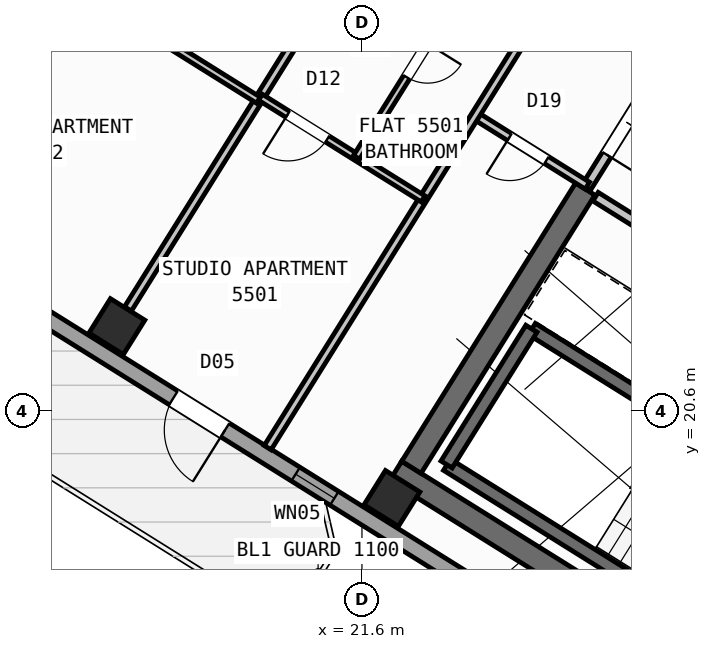
"""IFC4 building model, lengths in metres.
Left out: names, types, materials, properties, quantities, classifications, styles, units other than length and angle.
Written with IfcOpenShell. Run it as: python <this file> out.ifc"""

import sys

from ifc_helpers import new_model, si_unit, direction, frame, frame_2d, origin, origin_2d, place, context, subcontext, project, spatial, rectangle, hollow_rectangle, extrude, source, transform, mapped, element, fill, save


model = new_model("IFC4")
c1 = context("Model", 3, precision=1e-05, world=origin(), true_north=direction((0.0, 1.0)))
c2 = subcontext(c1, "Body", "Model", "MODEL_VIEW")
j1 = project(units=[si_unit("LENGTHUNIT", "METRE"), si_unit("PLANEANGLEUNIT", "RADIAN")], contexts=[c1])
p1 = place(None, origin())
s1 = spatial("IfcSite", under=j1, at=p1, CompositionType="ELEMENT")
p2 = place(p1, origin())
s2 = spatial("IfcBuilding", under=s1, at=p2, CompositionType="ELEMENT")
p3 = place(p2, frame((0.0, 0.0, 218.4)))
s3 = spatial("IfcBuildingStorey", under=s2, at=p3, CompositionType="ELEMENT", Elevation=218.4)
p4 = place(p3, frame((33.324, 12.503, 0.0), z_axis=(0.0, 0.0, 1.0), x_axis=(-0.848043529849, 0.529926571782, 0.0)))
e1 = element("IfcWall", 1, at=p4, inside=s3, PredefinedType="SHEAR", context=c2, shape_type="SweptSolid", body=[
    extrude(rectangle(XDim=13.04, YDim=0.45, at=frame_2d((6.52, 0.0))), origin(), (0.0, 0.0, 1.0), 3.35),
])
p5 = place(p3, frame((26.007, 24.976, 0.0), z_axis=(0.0, 0.0, 1.0), x_axis=(-0.529931155655, -0.848040665456, 0.0)))
e2 = element("IfcWall", 2, at=p5, inside=s3, PredefinedType="SHEAR", context=c2, shape_type="SweptSolid", body=[
    extrude(rectangle(XDim=6.475, YDim=0.45, at=frame_2d((3.238, 0.0))), origin(), (0.0, 0.0, 1.0), 3.35),
])
m1 = source(origin(), c2, "Body", "SweptSolid", [
    extrude(hollow_rectangle(XDim=0.8, YDim=0.8, WallThickness=0.032, at=origin_2d()), origin(), (0.0, 0.0, 1.0), 3.6),
])
for number, where, z_axis, x_axis in (
    (3, (22.191, 18.87, 0.0), (0.0, 0.0, 1.0), (-0.848, 0.53, 0.0)),
    (4, (16.764, 22.261, 0.0), (0.0, 0.0, 1.0), (-0.848, 0.53, 0.0)),
):
    element("IfcColumn", number, at=place(p3, frame(where, z_axis=z_axis, x_axis=x_axis)), inside=s3, PredefinedType="COLUMN", context=c2, shape_type="MappedRepresentation", body=[
        mapped(m1, transform((0.0, 0.0, 0.0), scale=1.0)),
    ])
p6 = place(p3, frame((31.76, 12.183, 0.0), z_axis=(0.0, 0.0, 1.0), x_axis=(-0.848047074256, 0.529920899612, 0.0)))
e5 = element("IfcWall", 5, at=p6, inside=s3, PredefinedType="STANDARD", context=c2, shape_type="SweptSolid", body=[
    extrude(rectangle(XDim=30.652, YDim=0.32, at=frame_2d((15.326, 0.0))), origin(), (0.0, 0.0, 1.0), 3.35),
])
p7 = place(p6, frame((15.166, 0.0, 0.0)))
e6 = element("IfcOpeningElement", 6, at=p7, cuts=e5, PredefinedType="OPENING", context=c2, shape_type="SweptSolid", body=[
    extrude(rectangle(XDim=1.2, YDim=2.15, at=frame_2d((0.6, 1.075))), frame((0.0, 0.17, 0.0), z_axis=(0.0, -1.0, 0.0), x_axis=(1.0, 0.0, 0.0)), (0.0, 0.0, 1.0), 0.34),
])
p8 = place(p6, frame((2.24, 0.0, 0.9)))
e7 = element("IfcOpeningElement", 7, at=p8, cuts=e5, PredefinedType="OPENING", context=c2, shape_type="SweptSolid", body=[
    extrude(rectangle(XDim=1.65, YDim=1.45, at=frame_2d((0.825, 0.725))), frame((0.0, 0.17, 0.0), z_axis=(0.0, -1.0, 0.0), x_axis=(1.0, 0.0, 0.0)), (0.0, 0.0, 1.0), 0.34),
])
p9 = place(p6, frame((7.469, 0.0, 0.9)))
e8 = element("IfcOpeningElement", 8, at=p9, cuts=e5, PredefinedType="OPENING", context=c2, shape_type="SweptSolid", body=[
    extrude(rectangle(XDim=1.65, YDim=1.45, at=frame_2d((0.825, 0.725))), frame((0.0, 0.17, 0.0), z_axis=(0.0, -1.0, 0.0), x_axis=(1.0, 0.0, 0.0)), (0.0, 0.0, 1.0), 0.34),
])
p10 = place(p6, frame((12.623, 0.0, 1.0)))
e9 = element("IfcOpeningElement", 9, at=p10, cuts=e5, PredefinedType="OPENING", context=c2, shape_type="SweptSolid", body=[
    extrude(rectangle(XDim=0.9, YDim=1.25, at=frame_2d((0.45, 0.625))), frame((0.0, 0.17, 0.0), z_axis=(0.0, -1.0, 0.0), x_axis=(1.0, 0.0, 0.0)), (0.0, 0.0, 1.0), 0.34),
])
p11 = place(p6, frame((19.583, 0.0, 1.0)))
e10 = element("IfcOpeningElement", 10, at=p11, cuts=e5, PredefinedType="OPENING", context=c2, shape_type="SweptSolid", body=[
    extrude(rectangle(XDim=0.9, YDim=1.25, at=frame_2d((0.45, 0.625))), frame((0.0, 0.17, 0.0), z_axis=(0.0, -1.0, 0.0), x_axis=(1.0, 0.0, 0.0)), (0.0, 0.0, 1.0), 0.34),
])
p12 = place(p6, frame((22.033, 0.0, 1.0)))
e11 = element("IfcOpeningElement", 11, at=p12, cuts=e5, PredefinedType="OPENING", context=c2, shape_type="SweptSolid", body=[
    extrude(rectangle(XDim=0.9, YDim=1.25, at=frame_2d((0.45, 0.625))), frame((0.0, 0.17, 0.0), z_axis=(0.0, -1.0, 0.0), x_axis=(1.0, 0.0, 0.0)), (0.0, 0.0, 1.0), 0.34),
])
p13 = place(p6, frame((27.666, 0.0, 0.9)))
e12 = element("IfcOpeningElement", 12, at=p13, cuts=e5, PredefinedType="OPENING", context=c2, shape_type="SweptSolid", body=[
    extrude(rectangle(XDim=1.35, YDim=1.45, at=frame_2d((0.675, 0.725))), frame((0.0, 0.17, 0.0), z_axis=(0.0, -1.0, 0.0), x_axis=(1.0, 0.0, 0.0)), (0.0, 0.0, 1.0), 0.34),
])
p14 = place(p3, frame((29.605, 15.581, 0.0), z_axis=(0.0, 0.0, 1.0), x_axis=(-0.848036911448, 0.529937163087, 0.0)))
e13 = element("IfcWall", 13, at=p14, inside=s3, PredefinedType="SHEAR", context=c2, shape_type="SweptSolid", body=[
    extrude(rectangle(XDim=7.46, YDim=0.26, at=frame_2d((3.73, 0.0))), origin(), (0.0, 0.0, 1.0), 3.35),
])
p15 = place(p3, frame((31.28, 18.261, 0.0), z_axis=(0.0, 0.0, 1.0), x_axis=(-0.848051618787, 0.529913626805, 0.0)))
e14 = element("IfcWall", 14, at=p15, inside=s3, PredefinedType="SHEAR", context=c2, shape_type="SweptSolid", body=[
    extrude(rectangle(XDim=7.46, YDim=0.26, at=frame_2d((3.73, 0.0))), origin(), (0.0, 0.0, 1.0), 3.35),
])
p16 = place(p15, frame((0.36, 0.0, 0.0)))
e15 = element("IfcOpeningElement", 15, at=p16, cuts=e14, PredefinedType="OPENING", context=c2, shape_type="SweptSolid", body=[
    extrude(rectangle(XDim=0.86, YDim=2.05, at=frame_2d((0.43, 1.025))), frame((0.0, 0.14, 0.0), z_axis=(0.0, -1.0, 0.0), x_axis=(1.0, 0.0, 0.0)), (0.0, 0.0, 1.0), 0.28),
])
p17 = place(p3, frame((24.945, 22.22, 0.0), z_axis=(0.0, 0.0, 1.0), x_axis=(-0.529908658664, -0.84805472316, 0.0)))
e16 = element("IfcWall", 16, at=p17, inside=s3, PredefinedType="SHEAR", context=c2, shape_type="SweptSolid", body=[
    extrude(rectangle(XDim=3.16, YDim=0.26, at=frame_2d((1.58, 0.0))), origin(), (0.0, 0.0, 1.0), 3.35),
])
p18 = place(p3, frame((31.525, 21.504, 0.0), z_axis=(0.0, 0.0, 1.0), x_axis=(-0.848042066329, 0.529928913853, 0.0)))
e17 = element("IfcWall", 17, at=p18, inside=s3, PredefinedType="STANDARD", context=c2, shape_type="SweptSolid", body=[
    extrude(rectangle(XDim=6.268, YDim=0.2, at=frame_2d((3.134, 0.0))), origin(), (0.0, 0.0, 1.0), 3.34),
])
p19 = place(p18, frame((4.4, 0.0, 0.0)))
e18 = element("IfcOpeningElement", 18, at=p19, cuts=e17, PredefinedType="OPENING", context=c2, shape_type="SweptSolid", body=[
    extrude(rectangle(XDim=0.86, YDim=2.05, at=frame_2d((0.43, 1.025))), frame((0.0, 0.11, 0.0), z_axis=(0.0, -1.0, 0.0), x_axis=(1.0, 0.0, 0.0)), (0.0, 0.0, 1.0), 0.22),
])
p20 = place(p18, frame((0.35, 0.0, 0.0)))
e19 = element("IfcOpeningElement", 19, at=p20, cuts=e17, PredefinedType="OPENING", context=c2, shape_type="SweptSolid", body=[
    extrude(rectangle(XDim=0.86, YDim=2.05, at=frame_2d((0.43, 1.025))), frame((0.0, 0.11, 0.0), z_axis=(0.0, -1.0, 0.0), x_axis=(1.0, 0.0, 0.0)), (0.0, 0.0, 1.0), 0.22),
])
p21 = place(p3, frame((27.596, 27.52, 0.0), z_axis=(0.0, 0.0, 1.0), x_axis=(-0.529865479138, -0.848081702443, 0.0)))
e20 = element("IfcWall", 20, at=p21, inside=s3, PredefinedType="STANDARD", context=c2, shape_type="SweptSolid", body=[
    extrude(rectangle(XDim=2.96, YDim=0.2, at=frame_2d((1.48, 0.0))), origin(), (0.0, 0.0, 1.0), 3.34),
])
p22 = place(p21, frame((0.7, 0.0, 0.0)))
e21 = element("IfcOpeningElement", 21, at=p22, cuts=e20, PredefinedType="OPENING", context=c2, shape_type="SweptSolid", body=[
    extrude(rectangle(XDim=1.5, YDim=2.15, at=frame_2d((0.75, 1.075))), frame((0.0, 0.11, 0.0), z_axis=(0.0, -1.0, 0.0), x_axis=(1.0, 0.0, 0.0)), (0.0, 0.0, 1.0), 0.22),
])
p23 = place(p3, frame((26.049, 25.044, 0.0), z_axis=(0.0, 0.0, 1.0), x_axis=(-0.848050851465, 0.529914854792, 0.0)))
e22 = element("IfcWall", 22, at=p23, inside=s3, PredefinedType="PARTITIONING", context=c2, shape_type="SweptSolid", body=[
    extrude(rectangle(XDim=2.61, YDim=0.16, at=frame_2d((1.305, 0.0))), origin(), (0.0, 0.0, 1.0), 2.825),
])
p24 = place(p23, frame((0.95, 0.0, 0.0)))
e23 = element("IfcOpeningElement", 23, at=p24, cuts=e22, PredefinedType="OPENING", context=c2, shape_type="SweptSolid", body=[
    extrude(rectangle(XDim=0.86, YDim=2.05, at=frame_2d((0.43, 1.025))), frame((0.0, 0.09, 0.0), z_axis=(0.0, -1.0, 0.0), x_axis=(1.0, 0.0, 0.0)), (0.0, 0.0, 1.0), 0.18),
])
p25 = place(p3, frame((25.198, 28.606, 0.0), z_axis=(0.0, 0.0, 1.0), x_axis=(-0.529926497642, -0.848043576178, 0.0)))
e24 = element("IfcWall", 24, at=p25, inside=s3, PredefinedType="PARTITIONING", context=c2, shape_type="SweptSolid", body=[
    extrude(rectangle(XDim=10.3, YDim=0.16, at=frame_2d((5.15, 0.0))), origin(), (0.0, 0.0, 1.0), 3.34),
])
p26 = place(p3, frame((20.414, 28.103, 0.0), z_axis=(0.0, 0.0, 1.0), x_axis=(-0.529934553702, -0.848038542045, 0.0)))
e25 = element("IfcWall", 25, at=p26, inside=s3, PredefinedType="PARTITIONING", context=c2, shape_type="SweptSolid", body=[
    extrude(rectangle(XDim=6.476, YDim=0.16, at=frame_2d((3.238, 0.0))), origin(), (0.0, 0.0, 1.0), 2.825),
])
p27 = place(p3, frame((22.807, 24.781, 0.0), z_axis=(0.0, 0.0, 1.0), x_axis=(-0.84803087207, 0.529946827537, 0.0)))
e26 = element("IfcWall", 26, at=p27, inside=s3, PredefinedType="PLUMBINGWALL", context=c2, shape_type="SweptSolid", body=[
    extrude(rectangle(XDim=3.79, YDim=0.14, at=frame_2d((1.895, 0.0))), origin(), (0.0, 0.0, 1.0), 3.34),
])
p28 = place(p27, frame((2.23, 0.0, 0.0)))
e27 = element("IfcOpeningElement", 27, at=p28, cuts=e26, PredefinedType="OPENING", context=c2, shape_type="SweptSolid", body=[
    extrude(rectangle(XDim=0.92, YDim=2.08, at=frame_2d((0.46, 1.04))), frame((0.0, 0.08, 0.0), z_axis=(0.0, -1.0, 0.0), x_axis=(1.0, 0.0, 0.0)), (0.0, 0.0, 1.0), 0.16),
])
p29 = place(p3, frame((23.883, 29.427, 0.0), z_axis=(0.0, 0.0, 1.0), x_axis=(-0.529950281337, -0.84802871373, 0.0)))
e28 = element("IfcWall", 28, at=p29, inside=s3, PredefinedType="PLUMBINGWALL", context=c2, shape_type="SweptSolid", body=[
    extrude(rectangle(XDim=4.51, YDim=0.14, at=frame_2d((2.255, 0.0))), origin(), (0.0, 0.0, 1.0), 2.995),
])
p30 = place(p29, frame((1.865, 0.0, 0.0)))
e29 = element("IfcOpeningElement", 29, at=p30, cuts=e28, PredefinedType="OPENING", context=c2, shape_type="SweptSolid", body=[
    extrude(rectangle(XDim=0.78, YDim=2.05, at=frame_2d((0.39, 1.025))), frame((0.0, 0.08, 0.0), z_axis=(0.0, -1.0, 0.0), x_axis=(1.0, 0.0, 0.0)), (0.0, 0.0, 1.0), 0.16),
])
p31 = place(p3, frame((19.556, 26.73, 0.0), z_axis=(0.0, 0.0, 1.0), x_axis=(-0.848043949058, 0.52992590092, 0.0)))
e30 = element("IfcWall", 30, at=p31, inside=s3, PredefinedType="PLUMBINGWALL", context=c2, shape_type="SweptSolid", body=[
    extrude(rectangle(XDim=12.92, YDim=0.14, at=frame_2d((6.46, 0.0))), origin(), (0.0, 0.0, 1.0), 3.34),
])
p32 = place(p31, frame((5.849, 0.0, 0.0)))
e31 = element("IfcOpeningElement", 31, at=p32, cuts=e30, PredefinedType="OPENING", context=c2, shape_type="SweptSolid", body=[
    extrude(rectangle(XDim=0.92, YDim=2.08, at=frame_2d((0.46, 1.04))), frame((0.0, 0.08, 0.0), z_axis=(0.0, -1.0, 0.0), x_axis=(1.0, 0.0, 0.0)), (0.0, 0.0, 1.0), 0.16),
])
m2 = source(origin(), c2, "Body", "SweptSolid", [
    extrude(rectangle(XDim=1.2, YDim=2.15, at=frame_2d((0.6, 1.075))), frame((0.0, 0.025, 0.0), z_axis=(0.0, -1.0, 0.0), x_axis=(1.0, 0.0, 0.0)), (0.0, 0.0, 1.0), 0.05),
])
p33 = place(p7, origin())
e32 = element("IfcDoor", 32, at=p33, inside=s3, OperationType="SINGLE_SWING_LEFT", PredefinedType="DOOR", context=c2, shape_type="MappedRepresentation", body=[
    mapped(m2, transform((0.0, 0.0, 0.0), scale=1.0)),
])
fill(e6, e32)
m3 = source(origin(), c2, "Body", "SweptSolid", [
    extrude(rectangle(XDim=0.9, YDim=1.25, at=frame_2d((0.45, 0.625))), frame((0.0, 0.03, 0.0), z_axis=(0.0, -1.0, 0.0), x_axis=(1.0, 0.0, 0.0)), (0.0, 0.0, 1.0), 0.06),
])
p34 = place(p10, origin())
e33 = element("IfcWindow", 33, at=p34, inside=s3, PartitioningType="SINGLE_PANEL", PredefinedType="WINDOW", context=c2, shape_type="MappedRepresentation", body=[
    mapped(m3, transform((0.0, 0.0, 0.0), scale=1.0)),
])
fill(e9, e33)
m4 = source(origin(), c2, "Body", "SweptSolid", [
    extrude(rectangle(XDim=0.86, YDim=2.05, at=frame_2d((0.43, 1.025))), frame((0.0, 0.025, 0.0), z_axis=(0.0, -1.0, 0.0), x_axis=(1.0, 0.0, 0.0)), (0.0, 0.0, 1.0), 0.05),
])
p35 = place(p24, origin())
e34 = element("IfcDoor", 34, at=p35, inside=s3, OperationType="SINGLE_SWING_RIGHT", PredefinedType="DOOR", context=c2, shape_type="MappedRepresentation", body=[
    mapped(m4, transform((0.0, 0.0, 0.0), scale=1.0)),
])
fill(e23, e34)
m5 = source(origin(), c2, "Body", "SweptSolid", [
    extrude(rectangle(XDim=1.5, YDim=2.15, at=frame_2d((0.75, 1.075))), frame((0.0, 0.025, 0.0), z_axis=(0.0, -1.0, 0.0), x_axis=(1.0, 0.0, 0.0)), (0.0, 0.0, 1.0), 0.05),
])
p36 = place(p22, origin())
e35 = element("IfcDoor", 35, at=p36, inside=s3, OperationType="DOUBLE_DOOR_SINGLE_SWING", PredefinedType="DOOR", context=c2, shape_type="MappedRepresentation", body=[
    mapped(m5, transform((0.0, 0.0, 0.0), scale=1.0)),
])
fill(e21, e35)
m6 = source(origin(), c2, "Body", "SweptSolid", [
    extrude(rectangle(XDim=0.92, YDim=2.08, at=frame_2d((0.46, 1.04))), frame((0.0, 0.025, 0.0), z_axis=(0.0, -1.0, 0.0), x_axis=(1.0, 0.0, 0.0)), (0.0, 0.0, 1.0), 0.05),
])
p37 = place(p28, origin())
e36 = element("IfcDoor", 36, at=p37, inside=s3, OperationType="SINGLE_SWING_RIGHT", PredefinedType="DOOR", context=c2, shape_type="MappedRepresentation", body=[
    mapped(m6, transform((0.0, 0.0, 0.0), scale=1.0)),
])
fill(e27, e36)
m7 = source(origin(), c2, "Body", "SweptSolid", [
    extrude(rectangle(XDim=0.78, YDim=2.05, at=frame_2d((0.39, 1.025))), frame((0.0, 0.025, 0.0), z_axis=(0.0, -1.0, 0.0), x_axis=(1.0, 0.0, 0.0)), (0.0, 0.0, 1.0), 0.05),
])
p38 = place(p30, origin())
e37 = element("IfcDoor", 37, at=p38, inside=s3, OperationType="SINGLE_SWING_LEFT", PredefinedType="DOOR", context=c2, shape_type="MappedRepresentation", body=[
    mapped(m7, transform((0.0, 0.0, 0.0), scale=1.0)),
])
fill(e29, e37)
save(model, sys.argv[1])
